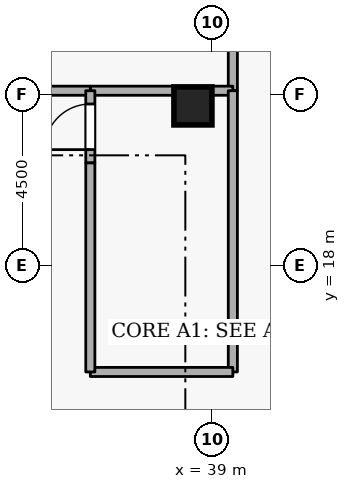
"""IFC4 building model, lengths in metres.
Left out: names, types, materials, properties, quantities, classifications, styles, units other than length and angle.
Written with IfcOpenShell. Run it as: python <this file> out.ifc"""

import sys

from ifc_helpers import new_model, si_unit, direction, frame, frame_2d, origin, origin_2d, place, context, subcontext, project, spatial, rectangle, extrude, element, fill, save


model = new_model("IFC4")
c1 = context("Model", 3, precision=1e-05, world=origin(), true_north=direction((0.0, 1.0)))
c2 = subcontext(c1, "Body", "Model", "MODEL_VIEW")
j1 = project(units=[si_unit("LENGTHUNIT", "METRE"), si_unit("PLANEANGLEUNIT", "RADIAN")], contexts=[c1])
p1 = place(None, origin())
s1 = spatial("IfcSite", under=j1, at=p1, CompositionType="ELEMENT")
p2 = place(p1, origin())
s2 = spatial("IfcBuilding", under=s1, at=p2, CompositionType="ELEMENT")
p3 = place(p2, frame((0.0, 0.0, 221.7)))
s3 = spatial("IfcBuildingStorey", under=s2, at=p3, CompositionType="ELEMENT", Elevation=221.7)
p4 = place(p3, frame((38.5, 22.2, 0.0), z_axis=(0.0, 0.0, 1.0), x_axis=(1.0, 0.0, 0.0)))
e1 = element("IfcColumn", 1, at=p4, inside=s3, PredefinedType="COLUMN", context=c2, shape_type="SweptSolid", body=[
    extrude(rectangle(XDim=1.0, YDim=1.0, at=origin_2d()), origin(), (0.0, 0.0, 1.0), 4.2),
])
p5 = place(p3, frame((39.55, 27.72, 0.0), z_axis=(0.0, 0.0, 1.0), x_axis=(0.0, -1.0, 0.0)))
e2 = element("IfcWall", 2, at=p5, inside=s3, PredefinedType="STANDARD", context=c2, shape_type="SweptSolid", body=[
    extrude(rectangle(XDim=5.12, YDim=0.24, at=frame_2d((2.56, 0.0))), origin(), (0.0, 0.0, 1.0), 3.94),
])
p6 = place(p3, frame((39.55, 22.6, 0.0), z_axis=(0.0, 0.0, 1.0), x_axis=(-1.0, 0.0, 0.0)))
e3 = element("IfcWall", 3, at=p6, inside=s3, PredefinedType="STANDARD", context=c2, shape_type="SweptSolid", body=[
    extrude(rectangle(XDim=3.75, YDim=0.24, at=frame_2d((1.875, 0.0))), origin(), (0.0, 0.0, 1.0), 3.94),
])
p7 = place(p3, frame((35.8, 22.6, 0.0), z_axis=(0.0, 0.0, 1.0), x_axis=(-1.0, 0.0, 0.0)))
e4 = element("IfcWall", 4, at=p7, inside=s3, PredefinedType="STANDARD", context=c2, shape_type="SweptSolid", body=[
    extrude(rectangle(XDim=2.9, YDim=0.24, at=frame_2d((1.45, 0.0))), origin(), (0.0, 0.0, 1.0), 3.94),
])
p8 = place(p3, frame((35.8, 20.7, 0.0), z_axis=(0.0, 0.0, 1.0), x_axis=(0.0, 1.0, 0.0)))
e5 = element("IfcWall", 5, at=p8, inside=s3, PredefinedType="STANDARD", context=c2, shape_type="SweptSolid", body=[
    extrude(rectangle(XDim=1.9, YDim=0.24, at=frame_2d((0.95, 0.0))), origin(), (0.0, 0.0, 1.0), 3.94),
])
p9 = place(p8, frame((0.35, 0.0, 0.0)))
e6 = element("IfcOpeningElement", 6, at=p9, cuts=e5, PredefinedType="OPENING", context=c2, shape_type="SweptSolid", body=[
    extrude(rectangle(XDim=1.2, YDim=2.1, at=frame_2d((0.6, 1.05))), frame((0.0, 0.13, 0.0), z_axis=(0.0, -1.0, 0.0), x_axis=(1.0, 0.0, 0.0)), (0.0, 0.0, 1.0), 0.26),
])
p10 = place(p3, frame((39.55, 22.6, 0.0), z_axis=(0.0, 0.0, 1.0), x_axis=(0.0, -1.0, 0.0)))
e7 = element("IfcWall", 7, at=p10, inside=s3, PredefinedType="STANDARD", context=c2, shape_type="SweptSolid", body=[
    extrude(rectangle(XDim=7.4, YDim=0.24, at=frame_2d((3.7, 0.0))), origin(), (0.0, 0.0, 1.0), 3.94),
])
p11 = place(p3, frame((39.55, 15.2, 0.0), z_axis=(0.0, 0.0, 1.0), x_axis=(-1.0, 0.0, 0.0)))
e8 = element("IfcWall", 8, at=p11, inside=s3, PredefinedType="STANDARD", context=c2, shape_type="SweptSolid", body=[
    extrude(rectangle(XDim=3.75, YDim=0.24, at=frame_2d((1.875, 0.0))), origin(), (0.0, 0.0, 1.0), 3.94),
])
p12 = place(p3, frame((35.8, 15.2, 0.0), z_axis=(0.0, 0.0, 1.0), x_axis=(0.0, 1.0, 0.0)))
e9 = element("IfcWall", 9, at=p12, inside=s3, PredefinedType="STANDARD", context=c2, shape_type="SweptSolid", body=[
    extrude(rectangle(XDim=5.5, YDim=0.24, at=frame_2d((2.75, 0.0))), origin(), (0.0, 0.0, 1.0), 3.94),
])
p13 = place(p9, origin())
e10 = element("IfcDoor", 10, at=p13, inside=s3, OperationType="SINGLE_SWING_LEFT", PredefinedType="DOOR", context=c2, shape_type="SweptSolid", body=[
    extrude(rectangle(XDim=1.2, YDim=2.1, at=frame_2d((0.6, 1.05))), frame((0.0, 0.025, 0.0), z_axis=(0.0, -1.0, 0.0), x_axis=(1.0, 0.0, 0.0)), (0.0, 0.0, 1.0), 0.05),
])
fill(e6, e10)
save(model, sys.argv[1])
